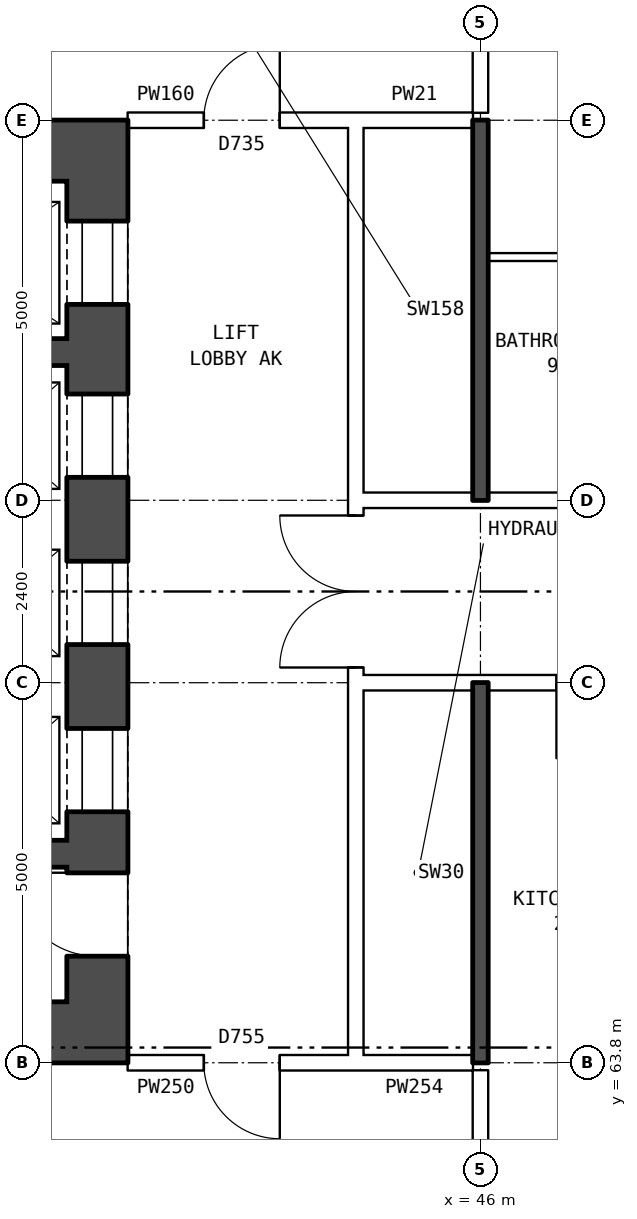
"""IFC4 building model, lengths in metres.
Left out: names, types, materials, properties, quantities, classifications, styles, units other than length and angle.
Written with IfcOpenShell. Run it as: python <this file> out.ifc"""

import sys

from ifc_helpers import new_model, si_unit, direction, frame, frame_2d, origin, place, context, subcontext, project, spatial, rectangle, extrude, element, fill, save


model = new_model("IFC4")
c1 = context("Model", 3, precision=1e-05, world=origin(), true_north=direction((0.0, 1.0)))
c2 = subcontext(c1, "Body", "Model", "MODEL_VIEW")
j1 = project(units=[si_unit("LENGTHUNIT", "METRE"), si_unit("PLANEANGLEUNIT", "RADIAN")], contexts=[c1])
p1 = place(None, origin())
s1 = spatial("IfcSite", under=j1, at=p1, CompositionType="ELEMENT")
p2 = place(p1, origin())
s2 = spatial("IfcBuilding", under=s1, at=p2, CompositionType="ELEMENT")
p3 = place(p2, frame((0.0, 0.0, 56.7)))
s3 = spatial("IfcBuildingStorey", under=s2, at=p3, CompositionType="ELEMENT", Elevation=56.7)
p4 = place(p3, frame((40.96, 75.4, 0.0), z_axis=(0.0, 0.0, 1.0), x_axis=(0.0, -1.0, 0.0)))
e1 = element("IfcWall", 1, at=p4, inside=s3, PredefinedType="SHEAR", context=c2, shape_type="SweptSolid", body=[
    extrude(rectangle(XDim=10.8, YDim=0.8, at=frame_2d((5.4, 0.0))), origin(), (0.0, 0.0, 1.0), 2.85),
])
p5 = place(p4, frame((0.525, 0.0, 0.0)))
e2 = element("IfcOpeningElement", 2, at=p5, cuts=e1, PredefinedType="OPENING", context=c2, shape_type="SweptSolid", body=[
    extrude(rectangle(XDim=1.1, YDim=2.1, at=frame_2d((0.55, 1.05))), frame((0.0, 0.41, 0.0), z_axis=(0.0, -1.0, 0.0), x_axis=(1.0, 0.0, 0.0)), (0.0, 0.0, 1.0), 0.82),
])
p6 = place(p4, frame((2.8, 0.0, 0.0)))
e3 = element("IfcOpeningElement", 3, at=p6, cuts=e1, PredefinedType="OPENING", context=c2, shape_type="SweptSolid", body=[
    extrude(rectangle(XDim=1.1, YDim=2.1, at=frame_2d((0.55, 1.05))), frame((0.0, 0.41, 0.0), z_axis=(0.0, -1.0, 0.0), x_axis=(1.0, 0.0, 0.0)), (0.0, 0.0, 1.0), 0.82),
])
p7 = place(p4, frame((5.0, 0.0, 0.0)))
e4 = element("IfcOpeningElement", 4, at=p7, cuts=e1, PredefinedType="OPENING", context=c2, shape_type="SweptSolid", body=[
    extrude(rectangle(XDim=1.1, YDim=2.1, at=frame_2d((0.55, 1.05))), frame((0.0, 0.41, 0.0), z_axis=(0.0, -1.0, 0.0), x_axis=(1.0, 0.0, 0.0)), (0.0, 0.0, 1.0), 0.82),
])
p8 = place(p4, frame((7.2, 0.0, 0.0)))
e5 = element("IfcOpeningElement", 5, at=p8, cuts=e1, PredefinedType="OPENING", context=c2, shape_type="SweptSolid", body=[
    extrude(rectangle(XDim=1.1, YDim=2.1, at=frame_2d((0.55, 1.05))), frame((0.0, 0.41, 0.0), z_axis=(0.0, -1.0, 0.0), x_axis=(1.0, 0.0, 0.0)), (0.0, 0.0, 1.0), 0.82),
])
p9 = place(p4, frame((9.1, 0.0, 0.0)))
e6 = element("IfcOpeningElement", 6, at=p9, cuts=e1, PredefinedType="OPENING", context=c2, shape_type="SweptSolid", body=[
    extrude(rectangle(XDim=1.1, YDim=2.1, at=frame_2d((0.55, 1.05))), frame((0.0, 0.41, 0.0), z_axis=(0.0, -1.0, 0.0), x_axis=(1.0, 0.0, 0.0)), (0.0, 0.0, 1.0), 0.82),
])
for number, where, z_axis, x_axis in (
    (7, (41.36, 75.8, 0.0), (0.0, 0.0, 1.0), (-1.0, 0.0, 0.0)),
    (8, (41.36, 64.2, 0.0), (0.0, 0.0, 1.0), (-1.0, 0.0, 0.0)),
):
    element("IfcWall", number, at=place(p3, frame(where, z_axis=z_axis, x_axis=x_axis)), inside=s3, PredefinedType="SHEAR", context=c2, shape_type="SweptSolid", body=[
        extrude(rectangle(XDim=9.0, YDim=0.8, at=frame_2d((4.5, 0.0))), origin(), (0.0, 0.0, 1.0), 2.85),
    ])
p10 = place(p3, frame((40.56, 73.15, 0.0), z_axis=(0.0, 0.0, 1.0), x_axis=(-1.0, 0.0, 0.0)))
e9 = element("IfcWall", 9, at=p10, inside=s3, PredefinedType="SHEAR", context=c2, shape_type="SweptSolid", body=[
    extrude(rectangle(XDim=3.245, YDim=0.35, at=frame_2d((1.623, 0.0))), origin(), (0.0, 0.0, 1.0), 2.85),
])
p11 = place(p3, frame((40.56, 66.55, 0.0), z_axis=(0.0, 0.0, 1.0), x_axis=(-1.0, 0.0, 0.0)))
e10 = element("IfcWall", 10, at=p11, inside=s3, PredefinedType="SHEAR", context=c2, shape_type="SweptSolid", body=[
    extrude(rectangle(XDim=2.075, YDim=0.35, at=frame_2d((1.038, 0.0))), origin(), (0.0, 0.0, 1.0), 2.85),
])
p12 = place(p3, frame((44.36, 63.9, 0.0), z_axis=(0.0, 0.0, 1.0), x_axis=(0.0, 1.0, 0.0)))
e11 = element("IfcWall", 11, at=p12, inside=s3, PredefinedType="PARTITIONING", context=c2, shape_type="SweptSolid", body=[
    extrude(rectangle(XDim=12.2, YDim=0.2, at=frame_2d((6.1, 0.0))), origin(), (0.0, 0.0, 1.0), 2.85),
])
p13 = place(p12, frame((5.1, 0.0, 0.0)))
e12 = element("IfcOpeningElement", 12, at=p13, cuts=e11, PredefinedType="OPENING", context=c2, shape_type="SweptSolid", body=[
    extrude(rectangle(XDim=2.0, YDim=2.1, at=frame_2d((1.0, 1.05))), frame((0.0, 0.11, 0.0), z_axis=(0.0, -1.0, 0.0), x_axis=(1.0, 0.0, 0.0)), (0.0, 0.0, 1.0), 0.22),
])
p14 = place(p3, frame((41.36, 63.8, 0.0), z_axis=(0.0, 0.0, 1.0), x_axis=(1.0, 0.0, 0.0)))
e13 = element("IfcWall", 13, at=p14, inside=s3, PredefinedType="PARTITIONING", context=c2, shape_type="SweptSolid", body=[
    extrude(rectangle(XDim=3.0, YDim=0.2, at=frame_2d((1.5, 0.0))), origin(), (0.0, 0.0, 1.0), 2.85),
])
p15 = place(p14, frame((1.0, 0.0, 0.0)))
e14 = element("IfcOpeningElement", 14, at=p15, cuts=e13, PredefinedType="OPENING", context=c2, shape_type="SweptSolid", body=[
    extrude(rectangle(XDim=1.0, YDim=2.1, at=frame_2d((0.5, 1.05))), frame((0.0, 0.11, 0.0), z_axis=(0.0, -1.0, 0.0), x_axis=(1.0, 0.0, 0.0)), (0.0, 0.0, 1.0), 0.22),
])
p16 = place(p3, frame((44.36, 63.8, 0.0), z_axis=(0.0, 0.0, 1.0), x_axis=(1.0, 0.0, 0.0)))
e15 = element("IfcWall", 15, at=p16, inside=s3, PredefinedType="PARTITIONING", context=c2, shape_type="SweptSolid", body=[
    extrude(rectangle(XDim=1.54, YDim=0.2, at=frame_2d((0.77, 0.0))), origin(), (0.0, 0.0, 1.0), 2.85),
])
p17 = place(p3, frame((44.36, 68.8, 0.0), z_axis=(0.0, 0.0, 1.0), x_axis=(1.0, 0.0, 0.0)))
e16 = element("IfcWall", 16, at=p17, inside=s3, PredefinedType="PARTITIONING", context=c2, shape_type="SweptSolid", body=[
    extrude(rectangle(XDim=19.28, YDim=0.2, at=frame_2d((9.64, 0.0))), origin(), (0.0, 0.0, 1.0), 2.85),
])
p18 = place(p17, frame((17.46, 0.0, 0.0)))
e17 = element("IfcOpeningElement", 17, at=p18, cuts=e16, PredefinedType="OPENING", context=c2, shape_type="SweptSolid", body=[
    extrude(rectangle(XDim=1.0, YDim=2.1, at=frame_2d((0.5, 1.05))), frame((0.0, 0.11, 0.0), z_axis=(0.0, -1.0, 0.0), x_axis=(1.0, 0.0, 0.0)), (0.0, 0.0, 1.0), 0.22),
])
p19 = place(p17, frame((11.64, 0.0, 0.0)))
e18 = element("IfcOpeningElement", 18, at=p19, cuts=e16, PredefinedType="OPENING", context=c2, shape_type="SweptSolid", body=[
    extrude(rectangle(XDim=1.0, YDim=2.1, at=frame_2d((0.5, 1.05))), frame((0.0, 0.11, 0.0), z_axis=(0.0, -1.0, 0.0), x_axis=(1.0, 0.0, 0.0)), (0.0, 0.0, 1.0), 0.22),
])
p20 = place(p17, frame((2.64, 0.0, 0.0)))
e19 = element("IfcOpeningElement", 19, at=p20, cuts=e16, PredefinedType="OPENING", context=c2, shape_type="SweptSolid", body=[
    extrude(rectangle(XDim=1.0, YDim=2.1, at=frame_2d((0.5, 1.05))), frame((0.0, 0.11, 0.0), z_axis=(0.0, -1.0, 0.0), x_axis=(1.0, 0.0, 0.0)), (0.0, 0.0, 1.0), 0.22),
])
p21 = place(p3, frame((44.36, 71.2, 0.0), z_axis=(0.0, 0.0, 1.0), x_axis=(1.0, 0.0, 0.0)))
e20 = element("IfcWall", 20, at=p21, inside=s3, PredefinedType="PARTITIONING", context=c2, shape_type="SweptSolid", body=[
    extrude(rectangle(XDim=19.28, YDim=0.2, at=frame_2d((9.64, 0.0))), origin(), (0.0, 0.0, 1.0), 2.85),
])
p22 = place(p21, frame((17.46, 0.0, 0.0)))
e21 = element("IfcOpeningElement", 21, at=p22, cuts=e20, PredefinedType="OPENING", context=c2, shape_type="SweptSolid", body=[
    extrude(rectangle(XDim=1.0, YDim=2.1, at=frame_2d((0.5, 1.05))), frame((0.0, 0.11, 0.0), z_axis=(0.0, -1.0, 0.0), x_axis=(1.0, 0.0, 0.0)), (0.0, 0.0, 1.0), 0.22),
])
p23 = place(p21, frame((8.64, 0.0, 0.0)))
e22 = element("IfcOpeningElement", 22, at=p23, cuts=e20, PredefinedType="OPENING", context=c2, shape_type="SweptSolid", body=[
    extrude(rectangle(XDim=1.0, YDim=2.1, at=frame_2d((0.5, 1.05))), frame((0.0, 0.11, 0.0), z_axis=(0.0, -1.0, 0.0), x_axis=(1.0, 0.0, 0.0)), (0.0, 0.0, 1.0), 0.22),
])
p24 = place(p21, frame((5.64, 0.0, 0.0)))
e23 = element("IfcOpeningElement", 23, at=p24, cuts=e20, PredefinedType="OPENING", context=c2, shape_type="SweptSolid", body=[
    extrude(rectangle(XDim=1.0, YDim=2.1, at=frame_2d((0.5, 1.05))), frame((0.0, 0.11, 0.0), z_axis=(0.0, -1.0, 0.0), x_axis=(1.0, 0.0, 0.0)), (0.0, 0.0, 1.0), 0.22),
])
p25 = place(p3, frame((46.1, 74.4, 0.0), z_axis=(0.0, 0.0, 1.0), x_axis=(1.0, 0.0, 0.0)))
e24 = element("IfcWall", 24, at=p25, inside=s3, PredefinedType="PARTITIONING", context=c2, shape_type="SweptSolid", body=[
    extrude(rectangle(XDim=2.9, YDim=0.1, at=frame_2d((1.45, 0.0))), origin(), (0.0, 0.0, 1.0), 2.85),
])
p26 = place(p3, frame((41.36, 76.2, 0.0), z_axis=(0.0, 0.0, 1.0), x_axis=(1.0, 0.0, 0.0)))
e25 = element("IfcWall", 25, at=p26, inside=s3, PredefinedType="PARTITIONING", context=c2, shape_type="SweptSolid", body=[
    extrude(rectangle(XDim=3.0, YDim=0.2, at=frame_2d((1.5, 0.0))), origin(), (0.0, 0.0, 1.0), 2.85),
])
p27 = place(p26, frame((1.0, 0.0, 0.0)))
e26 = element("IfcOpeningElement", 26, at=p27, cuts=e25, PredefinedType="OPENING", context=c2, shape_type="SweptSolid", body=[
    extrude(rectangle(XDim=1.0, YDim=2.1, at=frame_2d((0.5, 1.05))), frame((0.0, 0.11, 0.0), z_axis=(0.0, -1.0, 0.0), x_axis=(1.0, 0.0, 0.0)), (0.0, 0.0, 1.0), 0.22),
])
p28 = place(p3, frame((44.36, 76.2, 0.0), z_axis=(0.0, 0.0, 1.0), x_axis=(1.0, 0.0, 0.0)))
e27 = element("IfcWall", 27, at=p28, inside=s3, PredefinedType="PARTITIONING", context=c2, shape_type="SweptSolid", body=[
    extrude(rectangle(XDim=1.54, YDim=0.2, at=frame_2d((0.77, 0.0))), origin(), (0.0, 0.0, 1.0), 2.85),
])
p29 = place(p3, frame((46.0, 61.5, 0.0), z_axis=(0.0, 0.0, 1.0), x_axis=(0.0, 1.0, 0.0)))
e28 = element("IfcWall", 28, at=p29, inside=s3, PredefinedType="PARTITIONING", context=c2, shape_type="SweptSolid", body=[
    extrude(rectangle(XDim=2.2, YDim=0.2, at=frame_2d((1.1, 0.0))), origin(), (0.0, 0.0, 1.0), 2.85),
])
for number, where, z_axis, x_axis in (
    (29, (46.0, 63.8, 0.0), (0.0, 0.0, 1.0), (0.0, 1.0, 0.0)),
    (30, (46.0, 71.2, 0.0), (0.0, 0.0, 1.0), (0.0, 1.0, 0.0)),
):
    element("IfcWall", number, at=place(p3, frame(where, z_axis=z_axis, x_axis=x_axis)), inside=s3, PredefinedType="SOLIDWALL", context=c2, shape_type="SweptSolid", body=[
        extrude(rectangle(XDim=5.0, YDim=0.2, at=frame_2d((2.5, 0.0))), origin(), (0.0, 0.0, 1.0), 2.85),
    ])
p30 = place(p3, frame((46.0, 76.3, 0.0), z_axis=(0.0, 0.0, 1.0), x_axis=(0.0, 1.0, 0.0)))
e31 = element("IfcWall", 31, at=p30, inside=s3, PredefinedType="PARTITIONING", context=c2, shape_type="SweptSolid", body=[
    extrude(rectangle(XDim=2.2, YDim=0.2, at=frame_2d((1.1, 0.0))), origin(), (0.0, 0.0, 1.0), 2.85),
])
p31 = place(p5, origin())
e32 = element("IfcDoor", 32, at=p31, inside=s3, OperationType="DOUBLE_DOOR_SLIDING", PredefinedType="DOOR", context=c2, shape_type="SweptSolid", body=[
    extrude(rectangle(XDim=1.1, YDim=2.1, at=frame_2d((0.55, 1.05))), frame((0.0, -0.335, 0.0), z_axis=(0.0, -1.0, 0.0), x_axis=(1.0, 0.0, 0.0)), (0.0, 0.0, 1.0), 0.05),
])
fill(e2, e32)
p32 = place(p6, origin())
e33 = element("IfcDoor", 33, at=p32, inside=s3, OperationType="DOUBLE_DOOR_SLIDING", PredefinedType="DOOR", context=c2, shape_type="SweptSolid", body=[
    extrude(rectangle(XDim=1.1, YDim=2.1, at=frame_2d((0.55, 1.05))), frame((0.0, -0.335, 0.0), z_axis=(0.0, -1.0, 0.0), x_axis=(1.0, 0.0, 0.0)), (0.0, 0.0, 1.0), 0.05),
])
fill(e3, e33)
p33 = place(p7, origin())
e34 = element("IfcDoor", 34, at=p33, inside=s3, OperationType="DOUBLE_DOOR_SLIDING", PredefinedType="DOOR", context=c2, shape_type="SweptSolid", body=[
    extrude(rectangle(XDim=1.1, YDim=2.1, at=frame_2d((0.55, 1.05))), frame((0.0, -0.335, 0.0), z_axis=(0.0, -1.0, 0.0), x_axis=(1.0, 0.0, 0.0)), (0.0, 0.0, 1.0), 0.05),
])
fill(e4, e34)
p34 = place(p8, origin())
e35 = element("IfcDoor", 35, at=p34, inside=s3, OperationType="DOUBLE_DOOR_SLIDING", PredefinedType="DOOR", context=c2, shape_type="SweptSolid", body=[
    extrude(rectangle(XDim=1.1, YDim=2.1, at=frame_2d((0.55, 1.05))), frame((0.0, -0.335, 0.0), z_axis=(0.0, -1.0, 0.0), x_axis=(1.0, 0.0, 0.0)), (0.0, 0.0, 1.0), 0.05),
])
fill(e5, e35)
p35 = place(p9, frame((1.1, 0.0, 0.0), z_axis=(0.0, 0.0, 1.0), x_axis=(-1.0, 0.0, 0.0)))
e36 = element("IfcDoor", 36, at=p35, inside=s3, OperationType="SINGLE_SWING_RIGHT", PredefinedType="DOOR", context=c2, shape_type="SweptSolid", body=[
    extrude(rectangle(XDim=1.1, YDim=2.1, at=frame_2d((0.55, 1.05))), frame((0.0, 0.385, 0.0), z_axis=(0.0, -1.0, 0.0), x_axis=(1.0, 0.0, 0.0)), (0.0, 0.0, 1.0), 0.05),
])
fill(e6, e36)
p36 = place(p13, origin())
e37 = element("IfcDoor", 37, at=p36, inside=s3, OperationType="DOUBLE_DOOR_SINGLE_SWING", PredefinedType="DOOR", context=c2, shape_type="SweptSolid", body=[
    extrude(rectangle(XDim=2.0, YDim=2.1, at=frame_2d((1.0, 1.05))), frame((0.0, 0.025, 0.0), z_axis=(0.0, -1.0, 0.0), x_axis=(1.0, 0.0, 0.0)), (0.0, 0.0, 1.0), 0.05),
])
fill(e12, e37)
p37 = place(p15, frame((1.0, 0.0, 0.0), z_axis=(0.0, 0.0, 1.0), x_axis=(-1.0, 0.0, 0.0)))
e38 = element("IfcDoor", 38, at=p37, inside=s3, OperationType="SINGLE_SWING_LEFT", PredefinedType="DOOR", context=c2, shape_type="SweptSolid", body=[
    extrude(rectangle(XDim=1.0, YDim=2.1, at=frame_2d((0.5, 1.05))), frame((0.0, 0.025, 0.0), z_axis=(0.0, -1.0, 0.0), x_axis=(1.0, 0.0, 0.0)), (0.0, 0.0, 1.0), 0.05),
])
fill(e14, e38)
p38 = place(p27, origin())
e39 = element("IfcDoor", 39, at=p38, inside=s3, OperationType="SINGLE_SWING_RIGHT", PredefinedType="DOOR", context=c2, shape_type="SweptSolid", body=[
    extrude(rectangle(XDim=1.0, YDim=2.1, at=frame_2d((0.5, 1.05))), frame((0.0, 0.025, 0.0), z_axis=(0.0, -1.0, 0.0), x_axis=(1.0, 0.0, 0.0)), (0.0, 0.0, 1.0), 0.05),
])
fill(e26, e39)
save(model, sys.argv[1])
